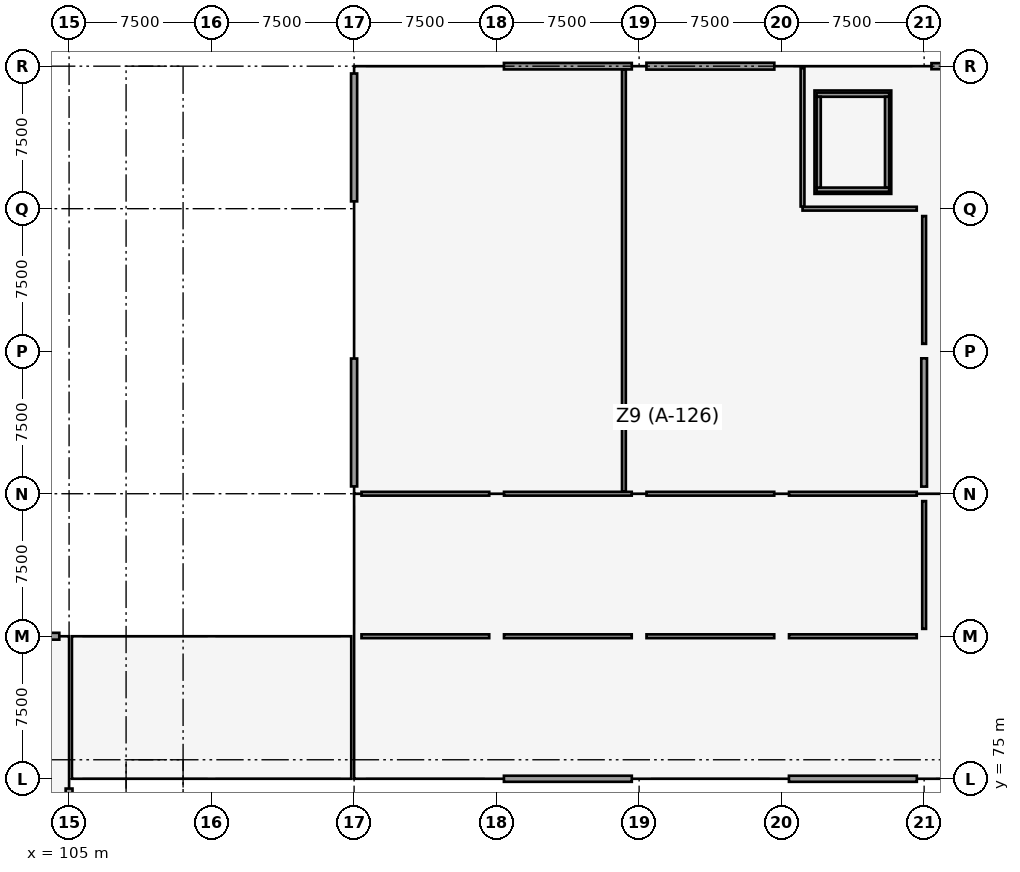
"""IFC4 building model, lengths in metres.
Left out: names, types, materials, properties, quantities, classifications, styles, units other than length and angle.
Written with IfcOpenShell. Run it as: python <this file> out.ifc"""

import sys

from ifc_helpers import new_model, si_unit, direction, frame, frame_2d, origin, origin_2d, place, context, subcontext, project, spatial, rectangle, extrude, element, fill, save


model = new_model("IFC4")
c1 = context("Model", 3, precision=1e-05, world=origin(), true_north=direction((0.0, 1.0)))
c2 = subcontext(c1, "Body", "Model", "MODEL_VIEW")
j1 = project(units=[si_unit("LENGTHUNIT", "METRE"), si_unit("PLANEANGLEUNIT", "RADIAN")], contexts=[c1])
p1 = place(None, origin())
s1 = spatial("IfcSite", under=j1, at=p1, CompositionType="ELEMENT")
p2 = place(p1, origin())
s2 = spatial("IfcBuilding", under=s1, at=p2, CompositionType="ELEMENT")
p3 = place(p2, origin())
s3 = spatial("IfcBuildingStorey", under=s2, at=p3, CompositionType="ELEMENT", Elevation=0.0)
for number, where, z_axis, x_axis in (
    (1, (105.0, 75.0, 0.0), (0.0, 0.0, 1.0), (1.0, 0.0, 0.0)),
    (2, (105.0, 82.5, 0.0), (0.0, 0.0, 1.0), (1.0, 0.0, 0.0)),
):
    element("IfcColumn", number, at=place(p3, frame(where, z_axis=z_axis, x_axis=x_axis)), inside=s3, PredefinedType="COLUMN", context=c2, shape_type="SweptSolid", body=[
        extrude(rectangle(XDim=1.0, YDim=1.0, at=origin_2d()), origin(), (0.0, 0.0, 1.0), 4.8),
    ])
for number, where, z_axis, x_axis in (
    (3, (120.0, 75.0, 0.0), (0.0, 0.0, 1.0), (1.0, 0.0, 0.0)),
    (4, (120.0, 82.5, 0.0), (0.0, 0.0, 1.0), (1.0, 0.0, 0.0)),
    (5, (120.0, 90.0, 0.0), (0.0, 0.0, 1.0), (1.0, 0.0, 0.0)),
    (6, (120.0, 97.5, 0.0), (0.0, 0.0, 1.0), (1.0, 0.0, 0.0)),
    (7, (120.0, 105.0, 0.0), (0.0, 0.0, 1.0), (1.0, 0.0, 0.0)),
    (8, (120.0, 112.5, 0.0), (0.0, 0.0, 1.0), (1.0, 0.0, 0.0)),
    (9, (127.5, 75.0, 0.0), (0.0, 0.0, 1.0), (1.0, 0.0, 0.0)),
    (10, (127.5, 82.5, 0.0), (0.0, 0.0, 1.0), (1.0, 0.0, 0.0)),
    (11, (127.5, 90.0, 0.0), (0.0, 0.0, 1.0), (1.0, 0.0, 0.0)),
    (12, (127.5, 97.5, 0.0), (0.0, 0.0, 1.0), (1.0, 0.0, 0.0)),
    (13, (127.5, 105.0, 0.0), (0.0, 0.0, 1.0), (1.0, 0.0, 0.0)),
    (14, (127.5, 112.5, 0.0), (0.0, 0.0, 1.0), (1.0, 0.0, 0.0)),
    (15, (135.0, 75.0, 0.0), (0.0, 0.0, 1.0), (1.0, 0.0, 0.0)),
    (16, (135.0, 82.5, 0.0), (0.0, 0.0, 1.0), (1.0, 0.0, 0.0)),
    (17, (135.0, 90.0, 0.0), (0.0, 0.0, 1.0), (1.0, 0.0, 0.0)),
    (18, (135.0, 97.5, 0.0), (0.0, 0.0, 1.0), (1.0, 0.0, 0.0)),
    (19, (135.0, 105.0, 0.0), (0.0, 0.0, 1.0), (1.0, 0.0, 0.0)),
    (20, (135.0, 112.5, 0.0), (0.0, 0.0, 1.0), (1.0, 0.0, 0.0)),
    (21, (142.5, 75.0, 0.0), (0.0, 0.0, 1.0), (1.0, 0.0, 0.0)),
    (22, (142.5, 82.5, 0.0), (0.0, 0.0, 1.0), (1.0, 0.0, 0.0)),
    (23, (142.5, 90.0, 0.0), (0.0, 0.0, 1.0), (1.0, 0.0, 0.0)),
    (24, (142.5, 97.5, 0.0), (0.0, 0.0, 1.0), (1.0, 0.0, 0.0)),
    (25, (142.5, 105.0, 0.0), (0.0, 0.0, 1.0), (1.0, 0.0, 0.0)),
    (26, (142.5, 112.5, 0.0), (0.0, 0.0, 1.0), (1.0, 0.0, 0.0)),
    (27, (150.0, 75.0, 0.0), (0.0, 0.0, 1.0), (1.0, 0.0, 0.0)),
    (28, (150.0, 82.5, 0.0), (0.0, 0.0, 1.0), (1.0, 0.0, 0.0)),
    (29, (150.0, 90.0, 0.0), (0.0, 0.0, 1.0), (1.0, 0.0, 0.0)),
    (30, (150.0, 97.5, 0.0), (0.0, 0.0, 1.0), (1.0, 0.0, 0.0)),
    (31, (150.0, 105.0, 0.0), (0.0, 0.0, 1.0), (1.0, 0.0, 0.0)),
    (32, (150.0, 112.5, 0.0), (0.0, 0.0, 1.0), (1.0, 0.0, 0.0)),
):
    element("IfcColumn", number, at=place(p3, frame(where, z_axis=z_axis, x_axis=x_axis)), inside=s3, PredefinedType="COLUMN", context=c2, shape_type="SweptSolid", body=[
        extrude(rectangle(XDim=0.75, YDim=0.75, at=origin_2d()), origin(), (0.0, 0.0, 1.0), 4.8),
    ])
p4 = place(p3, frame((150.0, 90.375, 0.0), z_axis=(0.0, 0.0, 1.0), x_axis=(0.0, 1.0, 0.0)))
e33 = element("IfcWall", 33, at=p4, inside=s3, PredefinedType="SHEAR", context=c2, shape_type="SweptSolid", body=[
    extrude(rectangle(XDim=6.75, YDim=0.3, at=frame_2d((3.375, 0.0))), origin(), (0.0, 0.0, 1.0), 4.5),
])
p5 = place(p3, frame((105.0, 68.015, 0.0), z_axis=(0.0, 0.0, 1.0), x_axis=(0.0, 1.0, 0.0)))
e34 = element("IfcWall", 34, at=p5, inside=s3, PredefinedType="SOLIDWALL", context=c2, shape_type="SweptSolid", body=[
    extrude(rectangle(XDim=6.47, YDim=0.36, at=frame_2d((3.235, 0.0))), origin(), (0.0, 0.0, 1.0), 3.57),
])
p6 = place(p3, frame((98.015, 82.5, 0.0), z_axis=(0.0, 0.0, 1.0), x_axis=(1.0, 0.0, 0.0)))
e35 = element("IfcWall", 35, at=p6, inside=s3, PredefinedType="SOLIDWALL", context=c2, shape_type="SweptSolid", body=[
    extrude(rectangle(XDim=6.47, YDim=0.36, at=frame_2d((3.235, 0.0))), origin(), (0.0, 0.0, 1.0), 3.72),
])
p7 = place(p6, frame((2.235, 0.0, 0.6)))
e36 = element("IfcOpeningElement", 36, at=p7, cuts=e35, PredefinedType="OPENING", context=c2, shape_type="SweptSolid", body=[
    extrude(rectangle(XDim=2.0, YDim=1.45, at=frame_2d((1.0, 0.725))), frame((0.0, 0.19, 0.0), z_axis=(0.0, -1.0, 0.0), x_axis=(1.0, 0.0, 0.0)), (0.0, 0.0, 1.0), 0.38),
])
p8 = place(p3, frame((127.885, 75.0, 0.0), z_axis=(0.0, 0.0, 1.0), x_axis=(1.0, 0.0, 0.0)))
e37 = element("IfcWall", 37, at=p8, inside=s3, PredefinedType="SOLIDWALL", context=c2, shape_type="SweptSolid", body=[
    extrude(rectangle(XDim=6.73, YDim=0.32, at=frame_2d((3.365, 0.0))), origin(), (0.0, 0.0, 1.0), 3.72),
])
p9 = place(p8, frame((2.74, 0.0, 0.6)))
e38 = element("IfcOpeningElement", 38, at=p9, cuts=e37, PredefinedType="OPENING", context=c2, shape_type="SweptSolid", body=[
    extrude(rectangle(XDim=1.25, YDim=1.8, at=frame_2d((0.625, 0.9))), frame((0.0, 0.17, 0.0), z_axis=(0.0, -1.0, 0.0), x_axis=(1.0, 0.0, 0.0)), (0.0, 0.0, 1.0), 0.34),
])
p10 = place(p3, frame((127.885, 112.5, 0.0), z_axis=(0.0, 0.0, 1.0), x_axis=(1.0, 0.0, 0.0)))
e39 = element("IfcWall", 39, at=p10, inside=s3, PredefinedType="SOLIDWALL", context=c2, shape_type="SweptSolid", body=[
    extrude(rectangle(XDim=6.73, YDim=0.34, at=frame_2d((3.365, 0.0))), origin(), (0.0, 0.0, 1.0), 3.72),
])
p11 = place(p10, frame((2.565, 0.0, 0.0)))
e40 = element("IfcOpeningElement", 40, at=p11, cuts=e39, PredefinedType="OPENING", context=c2, shape_type="SweptSolid", body=[
    extrude(rectangle(XDim=1.6, YDim=2.15, at=frame_2d((0.8, 1.075))), frame((0.0, 0.18, 0.0), z_axis=(0.0, -1.0, 0.0), x_axis=(1.0, 0.0, 0.0)), (0.0, 0.0, 1.0), 0.36),
])
p12 = place(p3, frame((135.385, 112.5, 0.0), z_axis=(0.0, 0.0, 1.0), x_axis=(1.0, 0.0, 0.0)))
e41 = element("IfcWall", 41, at=p12, inside=s3, PredefinedType="SOLIDWALL", context=c2, shape_type="SweptSolid", body=[
    extrude(rectangle(XDim=6.73, YDim=0.36, at=frame_2d((3.365, 0.0))), origin(), (0.0, 0.0, 1.0), 3.72),
])
p13 = place(p12, frame((1.065, 0.0, 0.0)))
e42 = element("IfcOpeningElement", 42, at=p13, cuts=e41, PredefinedType="OPENING", context=c2, shape_type="SweptSolid", body=[
    extrude(rectangle(XDim=4.6, YDim=3.1, at=frame_2d((2.3, 1.55))), frame((0.0, 0.19, 0.0), z_axis=(0.0, -1.0, 0.0), x_axis=(1.0, 0.0, 0.0)), (0.0, 0.0, 1.0), 0.38),
])
p14 = place(p3, frame((142.885, 75.0, 0.0), z_axis=(0.0, 0.0, 1.0), x_axis=(1.0, 0.0, 0.0)))
e43 = element("IfcWall", 43, at=p14, inside=s3, PredefinedType="SOLIDWALL", context=c2, shape_type="SweptSolid", body=[
    extrude(rectangle(XDim=6.73, YDim=0.32, at=frame_2d((3.365, 0.0))), origin(), (0.0, 0.0, 1.0), 3.72),
])
p15 = place(p14, frame((2.59, 0.0, 0.6)))
e44 = element("IfcOpeningElement", 44, at=p15, cuts=e43, PredefinedType="OPENING", context=c2, shape_type="SweptSolid", body=[
    extrude(rectangle(XDim=1.55, YDim=1.8, at=frame_2d((0.775, 0.9))), frame((0.0, 0.17, 0.0), z_axis=(0.0, -1.0, 0.0), x_axis=(1.0, 0.0, 0.0)), (0.0, 0.0, 1.0), 0.34),
])
p16 = place(p3, frame((150.385, 112.5, 0.0), z_axis=(0.0, 0.0, 1.0), x_axis=(1.0, 0.0, 0.0)))
e45 = element("IfcWall", 45, at=p16, inside=s3, PredefinedType="SOLIDWALL", context=c2, shape_type="SweptSolid", body=[
    extrude(rectangle(XDim=6.73, YDim=0.32, at=frame_2d((3.365, 0.0))), origin(), (0.0, 0.0, 1.0), 3.72),
])
p17 = place(p16, frame((2.215, 0.0, 0.6)))
e46 = element("IfcOpeningElement", 46, at=p17, cuts=e45, PredefinedType="OPENING", context=c2, shape_type="SweptSolid", body=[
    extrude(rectangle(XDim=2.3, YDim=1.3, at=frame_2d((1.15, 0.65))), frame((0.0, 0.17, 0.0), z_axis=(0.0, -1.0, 0.0), x_axis=(1.0, 0.0, 0.0)), (0.0, 0.0, 1.0), 0.34),
])
p18 = place(p3, frame((120.0, 90.385, 0.0), z_axis=(0.0, 0.0, 1.0), x_axis=(0.0, 1.0, 0.0)))
e47 = element("IfcWall", 47, at=p18, inside=s3, PredefinedType="SOLIDWALL", context=c2, shape_type="SweptSolid", body=[
    extrude(rectangle(XDim=6.73, YDim=0.32, at=frame_2d((3.365, 0.0))), origin(), (0.0, 0.0, 1.0), 3.57),
])
p19 = place(p18, frame((2.665, 0.0, 0.6)))
e48 = element("IfcOpeningElement", 48, at=p19, cuts=e47, PredefinedType="OPENING", context=c2, shape_type="SweptSolid", body=[
    extrude(rectangle(XDim=1.4, YDim=1.8, at=frame_2d((0.7, 0.9))), frame((0.0, 0.17, 0.0), z_axis=(0.0, -1.0, 0.0), x_axis=(1.0, 0.0, 0.0)), (0.0, 0.0, 1.0), 0.34),
])
p20 = place(p3, frame((120.0, 105.385, 0.0), z_axis=(0.0, 0.0, 1.0), x_axis=(0.0, 1.0, 0.0)))
e49 = element("IfcWall", 49, at=p20, inside=s3, PredefinedType="SOLIDWALL", context=c2, shape_type="SweptSolid", body=[
    extrude(rectangle(XDim=6.73, YDim=0.32, at=frame_2d((3.365, 0.0))), origin(), (0.0, 0.0, 1.0), 3.62),
])
p21 = place(p20, frame((2.515, 0.0, 0.6)))
e50 = element("IfcOpeningElement", 50, at=p21, cuts=e49, PredefinedType="OPENING", context=c2, shape_type="SweptSolid", body=[
    extrude(rectangle(XDim=1.7, YDim=1.8, at=frame_2d((0.85, 0.9))), frame((0.0, 0.17, 0.0), z_axis=(0.0, -1.0, 0.0), x_axis=(1.0, 0.0, 0.0)), (0.0, 0.0, 1.0), 0.34),
])
p22 = place(p3, frame((144.34, 106.0, 0.0), z_axis=(0.0, 0.0, 1.0), x_axis=(1.0, 0.0, 0.0)))
e51 = element("IfcWall", 51, at=p22, inside=s3, PredefinedType="SOLIDWALL", context=c2, shape_type="SweptSolid", body=[
    extrude(rectangle(XDim=3.82, YDim=0.22, at=frame_2d((1.91, 0.0))), origin(), (0.0, 0.0, 1.0), 4.5),
])
p23 = place(p22, frame((0.81, 0.0, 0.0)))
e52 = element("IfcOpeningElement", 52, at=p23, cuts=e51, PredefinedType="OPENING", context=c2, shape_type="SweptSolid", body=[
    extrude(rectangle(XDim=2.2, YDim=2.35, at=frame_2d((1.1, 1.175))), frame((0.0, 0.12, 0.0), z_axis=(0.0, -1.0, 0.0), x_axis=(1.0, 0.0, 0.0)), (0.0, 0.0, 1.0), 0.24),
])
p24 = place(p3, frame((144.34, 111.0, 0.0), z_axis=(0.0, 0.0, 1.0), x_axis=(1.0, 0.0, 0.0)))
e53 = element("IfcWall", 53, at=p24, inside=s3, PredefinedType="SOLIDWALL", context=c2, shape_type="SweptSolid", body=[
    extrude(rectangle(XDim=3.82, YDim=0.22, at=frame_2d((1.91, 0.0))), origin(), (0.0, 0.0, 1.0), 4.5),
])
for number, where, z_axis, x_axis in (
    (54, (144.45, 106.11, 0.0), (0.0, 0.0, 1.0), (0.0, 1.0, 0.0)),
    (55, (148.05, 106.11, 0.0), (0.0, 0.0, 1.0), (0.0, 1.0, 0.0)),
):
    element("IfcWall", number, at=place(p3, frame(where, z_axis=z_axis, x_axis=x_axis)), inside=s3, PredefinedType="SOLIDWALL", context=c2, shape_type="SweptSolid", body=[
        extrude(rectangle(XDim=4.78, YDim=0.22, at=frame_2d((2.39, 0.0))), origin(), (0.0, 0.0, 1.0), 4.5),
    ])
p25 = place(p3, frame((143.6, 105.0, 0.0), z_axis=(0.0, 0.0, 1.0), x_axis=(1.0, 0.0, 0.0)))
e56 = element("IfcWall", 56, at=p25, inside=s3, PredefinedType="PARTITIONING", context=c2, shape_type="SweptSolid", body=[
    extrude(rectangle(XDim=6.011, YDim=0.2, at=frame_2d((3.005, 0.0))), origin(), (0.0, 0.0, 1.0), 3.62),
])
p26 = place(p3, frame((143.6, 105.114, 0.0), z_axis=(0.0, 0.0, 1.0), x_axis=(0.0, 1.0, 0.0)))
e57 = element("IfcWall", 57, at=p26, inside=s3, PredefinedType="PARTITIONING", context=c2, shape_type="SweptSolid", body=[
    extrude(rectangle(XDim=7.274, YDim=0.2, at=frame_2d((3.637, 0.0))), origin(), (0.0, 0.0, 1.0), 3.62),
])
p27 = place(p26, frame((2.486, 0.0, 0.0)))
e58 = element("IfcOpeningElement", 58, at=p27, cuts=e57, PredefinedType="OPENING", context=c2, shape_type="SweptSolid", body=[
    extrude(rectangle(XDim=1.8, YDim=2.18, at=frame_2d((0.9, 1.09))), frame((0.0, 0.11, 0.0), z_axis=(0.0, -1.0, 0.0), x_axis=(1.0, 0.0, 0.0)), (0.0, 0.0, 1.0), 0.22),
])
for number, where, z_axis, x_axis in (
    (59, (120.389, 82.5, 0.0), (0.0, 0.0, 1.0), (1.0, 0.0, 0.0)),
    (60, (127.889, 82.5, 0.0), (0.0, 0.0, 1.0), (1.0, 0.0, 0.0)),
):
    element("IfcWall", number, at=place(p3, frame(where, z_axis=z_axis, x_axis=x_axis)), inside=s3, PredefinedType="PARTITIONING", context=c2, shape_type="SweptSolid", body=[
        extrude(rectangle(XDim=6.722, YDim=0.2, at=frame_2d((3.361, 0.0))), origin(), (0.0, 0.0, 1.0), 3.42),
    ])
p28 = place(p3, frame((135.389, 82.5, 0.0), z_axis=(0.0, 0.0, 1.0), x_axis=(1.0, 0.0, 0.0)))
e61 = element("IfcWall", 61, at=p28, inside=s3, PredefinedType="PARTITIONING", context=c2, shape_type="SweptSolid", body=[
    extrude(rectangle(XDim=6.722, YDim=0.2, at=frame_2d((3.361, 0.0))), origin(), (0.0, 0.0, 1.0), 3.42),
])
p29 = place(p28, frame((2.261, 0.0, 0.0)))
e62 = element("IfcOpeningElement", 62, at=p29, cuts=e61, PredefinedType="OPENING", context=c2, shape_type="SweptSolid", body=[
    extrude(rectangle(XDim=2.2, YDim=2.18, at=frame_2d((1.1, 1.09))), frame((0.0, 0.11, 0.0), z_axis=(0.0, -1.0, 0.0), x_axis=(1.0, 0.0, 0.0)), (0.0, 0.0, 1.0), 0.22),
])
p30 = place(p3, frame((142.889, 82.5, 0.0), z_axis=(0.0, 0.0, 1.0), x_axis=(1.0, 0.0, 0.0)))
e63 = element("IfcWall", 63, at=p30, inside=s3, PredefinedType="PARTITIONING", context=c2, shape_type="SweptSolid", body=[
    extrude(rectangle(XDim=6.722, YDim=0.2, at=frame_2d((3.361, 0.0))), origin(), (0.0, 0.0, 1.0), 3.42),
])
for number, where, z_axis, x_axis in (
    (64, (120.389, 90.0, 0.0), (0.0, 0.0, 1.0), (1.0, 0.0, 0.0)),
    (65, (127.889, 90.0, 0.0), (0.0, 0.0, 1.0), (1.0, 0.0, 0.0)),
    (66, (135.389, 90.0, 0.0), (0.0, 0.0, 1.0), (1.0, 0.0, 0.0)),
):
    element("IfcWall", number, at=place(p3, frame(where, z_axis=z_axis, x_axis=x_axis)), inside=s3, PredefinedType="PARTITIONING", context=c2, shape_type="SweptSolid", body=[
        extrude(rectangle(XDim=6.722, YDim=0.2, at=frame_2d((3.361, 0.0))), origin(), (0.0, 0.0, 1.0), 3.52),
    ])
p31 = place(p3, frame((142.889, 90.0, 0.0), z_axis=(0.0, 0.0, 1.0), x_axis=(1.0, 0.0, 0.0)))
e67 = element("IfcWall", 67, at=p31, inside=s3, PredefinedType="PARTITIONING", context=c2, shape_type="SweptSolid", body=[
    extrude(rectangle(XDim=6.722, YDim=0.2, at=frame_2d((3.361, 0.0))), origin(), (0.0, 0.0, 1.0), 3.42),
])
p32 = place(p3, frame((134.2, 90.114, 0.0), z_axis=(0.0, 0.0, 1.0), x_axis=(0.0, 1.0, 0.0)))
e68 = element("IfcWall", 68, at=p32, inside=s3, PredefinedType="PARTITIONING", context=c2, shape_type="SweptSolid", body=[
    extrude(rectangle(XDim=22.202, YDim=0.2, at=frame_2d((11.101, 0.0))), origin(), (0.0, 0.0, 1.0), 3.42),
])
p33 = place(p32, frame((10.236, 0.0, 0.0)))
e69 = element("IfcOpeningElement", 69, at=p33, cuts=e68, PredefinedType="OPENING", context=c2, shape_type="SweptSolid", body=[
    extrude(rectangle(XDim=1.8, YDim=2.18, at=frame_2d((0.9, 1.09))), frame((0.0, 0.11, 0.0), z_axis=(0.0, -1.0, 0.0), x_axis=(1.0, 0.0, 0.0)), (0.0, 0.0, 1.0), 0.22),
])
p34 = place(p3, frame((150.0, 82.889, 0.0), z_axis=(0.0, 0.0, 1.0), x_axis=(0.0, 1.0, 0.0)))
e70 = element("IfcWall", 70, at=p34, inside=s3, PredefinedType="PARTITIONING", context=c2, shape_type="SweptSolid", body=[
    extrude(rectangle(XDim=6.722, YDim=0.2, at=frame_2d((3.361, 0.0))), origin(), (0.0, 0.0, 1.0), 3.42),
])
p35 = place(p34, frame((2.261, 0.0, 0.0)))
e71 = element("IfcOpeningElement", 71, at=p35, cuts=e70, PredefinedType="OPENING", context=c2, shape_type="SweptSolid", body=[
    extrude(rectangle(XDim=2.2, YDim=2.18, at=frame_2d((1.1, 1.09))), frame((0.0, 0.11, 0.0), z_axis=(0.0, -1.0, 0.0), x_axis=(1.0, 0.0, 0.0)), (0.0, 0.0, 1.0), 0.22),
])
p36 = place(p3, frame((150.0, 97.889, 0.0), z_axis=(0.0, 0.0, 1.0), x_axis=(0.0, 1.0, 0.0)))
e72 = element("IfcWall", 72, at=p36, inside=s3, PredefinedType="PARTITIONING", context=c2, shape_type="SweptSolid", body=[
    extrude(rectangle(XDim=6.722, YDim=0.2, at=frame_2d((3.361, 0.0))), origin(), (0.0, 0.0, 1.0), 3.57),
])
p37 = place(p36, frame((2.461, 0.0, 0.0)))
e73 = element("IfcOpeningElement", 73, at=p37, cuts=e72, PredefinedType="OPENING", context=c2, shape_type="SweptSolid", body=[
    extrude(rectangle(XDim=1.8, YDim=2.18, at=frame_2d((0.9, 1.09))), frame((0.0, 0.11, 0.0), z_axis=(0.0, -1.0, 0.0), x_axis=(1.0, 0.0, 0.0)), (0.0, 0.0, 1.0), 0.22),
])
p38 = place(p9, origin())
e74 = element("IfcWindow", 74, at=p38, inside=s3, PartitioningType="SINGLE_PANEL", PredefinedType="WINDOW", context=c2, shape_type="SweptSolid", body=[
    extrude(rectangle(XDim=1.25, YDim=1.8, at=frame_2d((0.625, 0.9))), frame((0.0, 0.03, 0.0), z_axis=(0.0, -1.0, 0.0), x_axis=(1.0, 0.0, 0.0)), (0.0, 0.0, 1.0), 0.06),
])
fill(e38, e74)
p39 = place(p11, origin())
e75 = element("IfcDoor", 75, at=p39, inside=s3, OperationType="SINGLE_SWING_LEFT", PredefinedType="DOOR", context=c2, shape_type="SweptSolid", body=[
    extrude(rectangle(XDim=1.6, YDim=2.15, at=frame_2d((0.8, 1.075))), frame((0.0, 0.025, 0.0), z_axis=(0.0, -1.0, 0.0), x_axis=(1.0, 0.0, 0.0)), (0.0, 0.0, 1.0), 0.05),
])
fill(e40, e75)
p40 = place(p13, origin())
e76 = element("IfcDoor", 76, at=p40, inside=s3, OperationType="ROLLINGUP", PredefinedType="GATE", context=c2, shape_type="SweptSolid", body=[
    extrude(rectangle(XDim=4.6, YDim=3.1, at=frame_2d((2.3, 1.55))), frame((0.0, 0.025, 0.0), z_axis=(0.0, -1.0, 0.0), x_axis=(1.0, 0.0, 0.0)), (0.0, 0.0, 1.0), 0.05),
])
fill(e42, e76)
p41 = place(p15, origin())
e77 = element("IfcWindow", 77, at=p41, inside=s3, PartitioningType="SINGLE_PANEL", PredefinedType="WINDOW", context=c2, shape_type="SweptSolid", body=[
    extrude(rectangle(XDim=1.55, YDim=1.8, at=frame_2d((0.775, 0.9))), frame((0.0, 0.03, 0.0), z_axis=(0.0, -1.0, 0.0), x_axis=(1.0, 0.0, 0.0)), (0.0, 0.0, 1.0), 0.06),
])
fill(e44, e77)
p42 = place(p19, origin())
e78 = element("IfcWindow", 78, at=p42, inside=s3, PartitioningType="SINGLE_PANEL", PredefinedType="WINDOW", context=c2, shape_type="SweptSolid", body=[
    extrude(rectangle(XDim=1.4, YDim=1.8, at=frame_2d((0.7, 0.9))), frame((0.0, 0.03, 0.0), z_axis=(0.0, -1.0, 0.0), x_axis=(1.0, 0.0, 0.0)), (0.0, 0.0, 1.0), 0.06),
])
fill(e48, e78)
p43 = place(p21, origin())
e79 = element("IfcWindow", 79, at=p43, inside=s3, PartitioningType="SINGLE_PANEL", PredefinedType="WINDOW", context=c2, shape_type="SweptSolid", body=[
    extrude(rectangle(XDim=1.7, YDim=1.8, at=frame_2d((0.85, 0.9))), frame((0.0, 0.03, 0.0), z_axis=(0.0, -1.0, 0.0), x_axis=(1.0, 0.0, 0.0)), (0.0, 0.0, 1.0), 0.06),
])
fill(e50, e79)
p44 = place(p23, origin())
e80 = element("IfcDoor", 80, at=p44, inside=s3, OperationType="DOUBLE_DOOR_SLIDING", PredefinedType="DOOR", context=c2, shape_type="SweptSolid", body=[
    extrude(rectangle(XDim=2.2, YDim=2.35, at=frame_2d((1.1, 1.175))), frame((0.0, 0.025, 0.0), z_axis=(0.0, -1.0, 0.0), x_axis=(1.0, 0.0, 0.0)), (0.0, 0.0, 1.0), 0.05),
])
fill(e52, e80)
p45 = place(p27, origin())
e81 = element("IfcDoor", 81, at=p45, inside=s3, OperationType="SINGLE_SWING_RIGHT", PredefinedType="DOOR", context=c2, shape_type="SweptSolid", body=[
    extrude(rectangle(XDim=1.8, YDim=2.18, at=frame_2d((0.9, 1.09))), frame((0.0, 0.025, 0.0), z_axis=(0.0, -1.0, 0.0), x_axis=(1.0, 0.0, 0.0)), (0.0, 0.0, 1.0), 0.05),
])
fill(e58, e81)
p46 = place(p29, origin())
e82 = element("IfcDoor", 82, at=p46, inside=s3, OperationType="SINGLE_SWING_RIGHT", PredefinedType="DOOR", context=c2, shape_type="SweptSolid", body=[
    extrude(rectangle(XDim=2.2, YDim=2.18, at=frame_2d((1.1, 1.09))), frame((0.0, 0.025, 0.0), z_axis=(0.0, -1.0, 0.0), x_axis=(1.0, 0.0, 0.0)), (0.0, 0.0, 1.0), 0.05),
])
fill(e62, e82)
p47 = place(p33, origin())
e83 = element("IfcDoor", 83, at=p47, inside=s3, OperationType="SINGLE_SWING_LEFT", PredefinedType="DOOR", context=c2, shape_type="SweptSolid", body=[
    extrude(rectangle(XDim=1.8, YDim=2.18, at=frame_2d((0.9, 1.09))), frame((0.0, 0.025, 0.0), z_axis=(0.0, -1.0, 0.0), x_axis=(1.0, 0.0, 0.0)), (0.0, 0.0, 1.0), 0.05),
])
fill(e69, e83)
p48 = place(p35, origin())
e84 = element("IfcDoor", 84, at=p48, inside=s3, OperationType="SINGLE_SWING_RIGHT", PredefinedType="DOOR", context=c2, shape_type="SweptSolid", body=[
    extrude(rectangle(XDim=2.2, YDim=2.18, at=frame_2d((1.1, 1.09))), frame((0.0, 0.025, 0.0), z_axis=(0.0, -1.0, 0.0), x_axis=(1.0, 0.0, 0.0)), (0.0, 0.0, 1.0), 0.05),
])
fill(e71, e84)
p49 = place(p37, origin())
e85 = element("IfcDoor", 85, at=p49, inside=s3, OperationType="SINGLE_SWING_LEFT", PredefinedType="DOOR", context=c2, shape_type="SweptSolid", body=[
    extrude(rectangle(XDim=1.8, YDim=2.18, at=frame_2d((0.9, 1.09))), frame((0.0, 0.025, 0.0), z_axis=(0.0, -1.0, 0.0), x_axis=(1.0, 0.0, 0.0)), (0.0, 0.0, 1.0), 0.05),
])
fill(e73, e85)
save(model, sys.argv[1])
